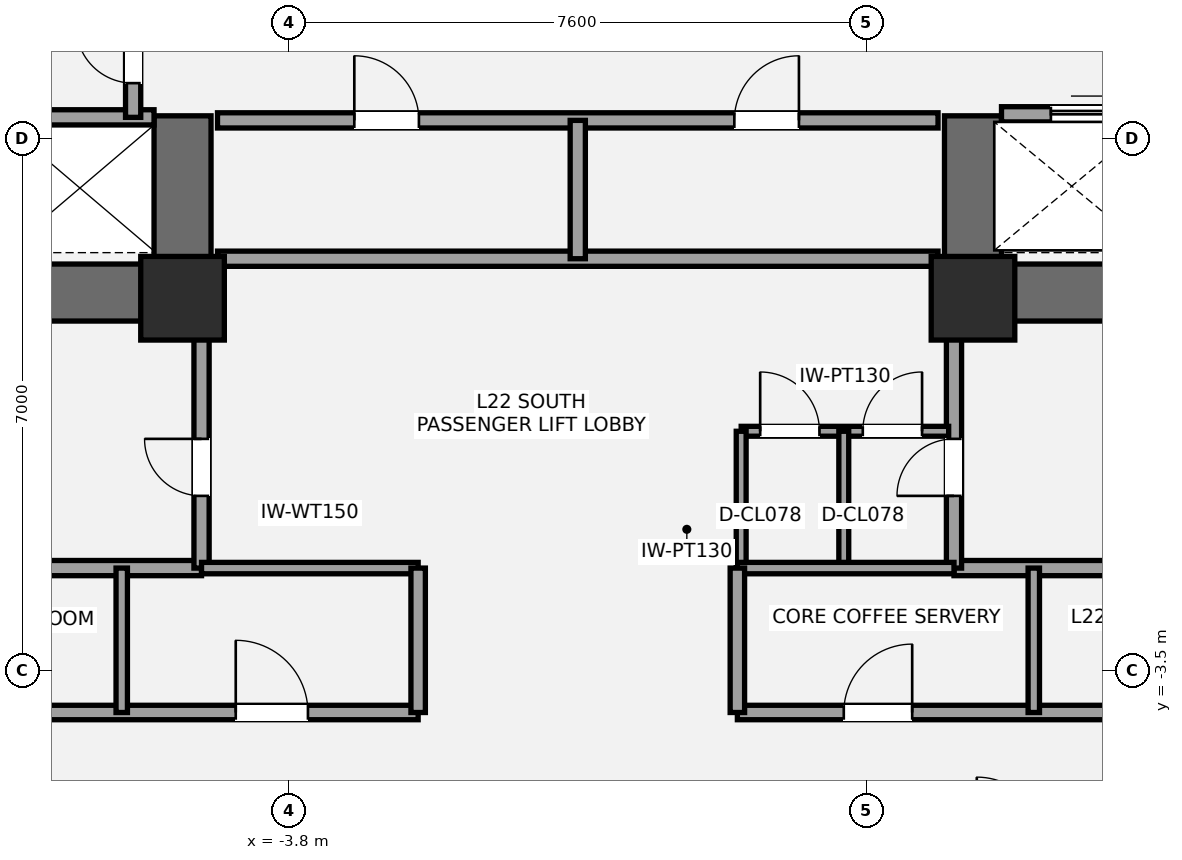
"""IFC4 building model, lengths in metres.
Left out: names, types, materials, properties, quantities, classifications, styles, units other than length and angle.
Written with IfcOpenShell. Run it as: python <this file> out.ifc"""

import sys

from ifc_helpers import new_model, si_unit, direction, frame, frame_2d, origin, origin_2d, place, context, subcontext, project, spatial, rectangle, extrude, element, fill, save


model = new_model("IFC4")
c1 = context("Model", 3, precision=1e-05, world=origin(), true_north=direction((0.0, 1.0)))
c2 = subcontext(c1, "Body", "Model", "MODEL_VIEW")
j1 = project(units=[si_unit("LENGTHUNIT", "METRE"), si_unit("PLANEANGLEUNIT", "RADIAN")], contexts=[c1])
p1 = place(None, origin())
s1 = spatial("IfcSite", under=j1, at=p1, CompositionType="ELEMENT")
p2 = place(p1, origin())
s2 = spatial("IfcBuilding", under=s1, at=p2, CompositionType="ELEMENT")
p3 = place(p2, frame((0.0, 0.0, 86.1)))
s3 = spatial("IfcBuildingStorey", under=s2, at=p3, CompositionType="ELEMENT", Elevation=86.1)
p4 = place(p3, frame((-4.825, 1.475, 0.0), z_axis=(0.0, 0.0, 1.0), x_axis=(-1.0, 0.0, 0.0)))
e1 = element("IfcWall", 1, at=p4, inside=s3, PredefinedType="SHEAR", context=c2, shape_type="SweptSolid", body=[
    extrude(rectangle(XDim=9.075, YDim=0.75, at=frame_2d((4.538, 0.0))), origin(), (0.0, 0.0, 1.0), 3.5),
])
p5 = place(p4, frame((5.475, 0.0, 0.0)))
e2 = element("IfcOpeningElement", 2, at=p5, cuts=e1, PredefinedType="OPENING", context=c2, shape_type="SweptSolid", body=[
    extrude(rectangle(XDim=1.05, YDim=2.15, at=frame_2d((0.525, 1.075))), frame((0.0, 0.385, 0.0), z_axis=(0.0, -1.0, 0.0), x_axis=(1.0, 0.0, 0.0)), (0.0, 0.0, 1.0), 0.77),
])
p6 = place(p4, frame((3.805, 0.0, 0.0)))
e3 = element("IfcOpeningElement", 3, at=p6, cuts=e1, PredefinedType="OPENING", context=c2, shape_type="SweptSolid", body=[
    extrude(rectangle(XDim=1.1, YDim=2.2, at=frame_2d((0.55, 1.1))), frame((0.0, 0.385, 0.0), z_axis=(0.0, -1.0, 0.0), x_axis=(1.0, 0.0, 0.0)), (0.0, 0.0, 1.0), 0.77),
])
p7 = place(p3, frame((-5.2, 1.1, 0.0), z_axis=(0.0, 0.0, 1.0), x_axis=(0.0, 1.0, 0.0)))
e4 = element("IfcWall", 4, at=p7, inside=s3, PredefinedType="SHEAR", context=c2, shape_type="SweptSolid", body=[
    extrude(rectangle(XDim=2.7, YDim=0.75, at=frame_2d((1.35, 0.0))), origin(), (0.0, 0.0, 1.0), 3.5),
])
p8 = place(p3, frame((13.9, 1.475, 0.0), z_axis=(0.0, 0.0, 1.0), x_axis=(-1.0, 0.0, 0.0)))
e5 = element("IfcWall", 5, at=p8, inside=s3, PredefinedType="SHEAR", context=c2, shape_type="SweptSolid", body=[
    extrude(rectangle(XDim=9.075, YDim=0.75, at=frame_2d((4.538, 0.0))), origin(), (0.0, 0.0, 1.0), 3.5),
])
p9 = place(p8, frame((2.55, 0.0, 0.0)))
e6 = element("IfcOpeningElement", 6, at=p9, cuts=e5, PredefinedType="OPENING", context=c2, shape_type="SweptSolid", body=[
    extrude(rectangle(XDim=1.05, YDim=2.15, at=frame_2d((0.525, 1.075))), frame((0.0, 0.385, 0.0), z_axis=(0.0, -1.0, 0.0), x_axis=(1.0, 0.0, 0.0)), (0.0, 0.0, 1.0), 0.77),
])
p10 = place(p8, frame((4.55, 0.0, 0.0)))
e7 = element("IfcOpeningElement", 7, at=p10, cuts=e5, PredefinedType="OPENING", context=c2, shape_type="SweptSolid", body=[
    extrude(rectangle(XDim=1.1, YDim=2.2, at=frame_2d((0.55, 1.1))), frame((0.0, 0.385, 0.0), z_axis=(0.0, -1.0, 0.0), x_axis=(1.0, 0.0, 0.0)), (0.0, 0.0, 1.0), 0.77),
])
p11 = place(p3, frame((5.2, 1.1, 0.0), z_axis=(0.0, 0.0, 1.0), x_axis=(0.0, 1.0, 0.0)))
e8 = element("IfcWall", 8, at=p11, inside=s3, PredefinedType="SHEAR", context=c2, shape_type="SweptSolid", body=[
    extrude(rectangle(XDim=2.7, YDim=0.75, at=frame_2d((1.35, 0.0))), origin(), (0.0, 0.0, 1.0), 3.5),
])
for number, where, z_axis, x_axis in (
    (9, (-5.2, 1.4, 0.0), (0.0, 0.0, 1.0), (1.0, 0.0, 0.0)),
    (10, (5.2, 1.4, 0.0), (0.0, 0.0, 1.0), (1.0, 0.0, 0.0)),
):
    element("IfcColumn", number, at=place(p3, frame(where, z_axis=z_axis, x_axis=x_axis)), inside=s3, PredefinedType="COLUMN", context=c2, shape_type="SweptSolid", body=[
        extrude(rectangle(XDim=1.1, YDim=1.1, at=origin_2d()), origin(), (0.0, 0.0, 1.0), 3.5),
    ])
p12 = place(p3, frame((-7.2, -2.15, 0.0), z_axis=(0.0, 0.0, 1.0), x_axis=(1.0, 0.0, 0.0)))
e11 = element("IfcWall", 11, at=p12, inside=s3, PredefinedType="SOLIDWALL", context=c2, shape_type="SweptSolid", body=[
    extrude(rectangle(XDim=2.25, YDim=0.2, at=frame_2d((1.125, 0.0))), origin(), (0.0, 0.0, 1.0), 3.31),
])
p13 = place(p3, frame((-4.95, -2.15, 0.0), z_axis=(0.0, 0.0, 1.0), x_axis=(0.0, 1.0, 0.0)))
e12 = element("IfcWall", 12, at=p13, inside=s3, PredefinedType="SOLIDWALL", context=c2, shape_type="SweptSolid", body=[
    extrude(rectangle(XDim=3.3, YDim=0.2, at=frame_2d((1.65, 0.0))), origin(), (0.0, 0.0, 1.0), 2.763),
])
p14 = place(p13, frame((0.95, 0.0, 0.0)))
e13 = element("IfcOpeningElement", 13, at=p14, cuts=e12, PredefinedType="OPENING", context=c2, shape_type="SweptSolid", body=[
    extrude(rectangle(XDim=0.75, YDim=2.1, at=frame_2d((0.375, 1.05))), frame((0.0, 0.11, 0.0), z_axis=(0.0, -1.0, 0.0), x_axis=(1.0, 0.0, 0.0)), (0.0, 0.0, 1.0), 0.22),
])
p15 = place(p3, frame((4.95, -2.15, 0.0), z_axis=(0.0, 0.0, 1.0), x_axis=(1.0, 0.0, 0.0)))
e14 = element("IfcWall", 14, at=p15, inside=s3, PredefinedType="SOLIDWALL", context=c2, shape_type="SweptSolid", body=[
    extrude(rectangle(XDim=2.25, YDim=0.2, at=frame_2d((1.125, 0.0))), origin(), (0.0, 0.0, 1.0), 3.31),
])
p16 = place(p3, frame((4.95, -2.15, 0.0), z_axis=(0.0, 0.0, 1.0), x_axis=(0.0, 1.0, 0.0)))
e15 = element("IfcWall", 15, at=p16, inside=s3, PredefinedType="SOLIDWALL", context=c2, shape_type="SweptSolid", body=[
    extrude(rectangle(XDim=3.3, YDim=0.2, at=frame_2d((1.65, 0.0))), origin(), (0.0, 0.0, 1.0), 2.763),
])
p17 = place(p16, frame((0.95, 0.0, 0.0)))
e16 = element("IfcOpeningElement", 16, at=p17, cuts=e15, PredefinedType="OPENING", context=c2, shape_type="SweptSolid", body=[
    extrude(rectangle(XDim=0.75, YDim=2.1, at=frame_2d((0.375, 1.05))), frame((0.0, 0.11, 0.0), z_axis=(0.0, -1.0, 0.0), x_axis=(1.0, 0.0, 0.0)), (0.0, 0.0, 1.0), 0.22),
])
p18 = place(p3, frame((2.15, -0.35, 0.0), z_axis=(0.0, 0.0, 1.0), x_axis=(1.0, 0.0, 0.0)))
e17 = element("IfcWall", 17, at=p18, inside=s3, PredefinedType="PARTITIONING", context=c2, shape_type="SweptSolid", body=[
    extrude(rectangle(XDim=2.73, YDim=0.13, at=frame_2d((1.365, 0.0))), origin(), (0.0, 0.0, 1.0), 3.31),
])
p19 = place(p18, frame((0.25, 0.0, 0.0)))
e18 = element("IfcOpeningElement", 18, at=p19, cuts=e17, PredefinedType="OPENING", context=c2, shape_type="SweptSolid", body=[
    extrude(rectangle(XDim=0.78, YDim=2.1, at=frame_2d((0.39, 1.05))), frame((0.0, 0.075, 0.0), z_axis=(0.0, -1.0, 0.0), x_axis=(1.0, 0.0, 0.0)), (0.0, 0.0, 1.0), 0.15),
])
p20 = place(p18, frame((1.6, 0.0, 0.0)))
e19 = element("IfcOpeningElement", 19, at=p20, cuts=e17, PredefinedType="OPENING", context=c2, shape_type="SweptSolid", body=[
    extrude(rectangle(XDim=0.78, YDim=2.1, at=frame_2d((0.39, 1.05))), frame((0.0, 0.075, 0.0), z_axis=(0.0, -1.0, 0.0), x_axis=(1.0, 0.0, 0.0)), (0.0, 0.0, 1.0), 0.15),
])
for number, where, z_axis, x_axis in (
    (20, (2.15, -2.15, 0.0), (0.0, 0.0, 1.0), (0.0, 1.0, 0.0)),
    (21, (3.5, -2.15, 0.0), (0.0, 0.0, 1.0), (0.0, 1.0, 0.0)),
):
    element("IfcWall", number, at=place(p3, frame(where, z_axis=z_axis, x_axis=x_axis)), inside=s3, PredefinedType="PARTITIONING", context=c2, shape_type="SweptSolid", body=[
        extrude(rectangle(XDim=1.8, YDim=0.13, at=frame_2d((0.9, 0.0))), origin(), (0.0, 0.0, 1.0), 3.31),
    ])
p21 = place(p3, frame((-9.78, 3.78, 0.0), z_axis=(0.0, 0.0, 1.0), x_axis=(1.0, 0.0, 0.0)))
e22 = element("IfcWall", 22, at=p21, inside=s3, PredefinedType="SOLIDWALL", context=c2, shape_type="SweptSolid", body=[
    extrude(rectangle(XDim=4.205, YDim=0.2, at=frame_2d((2.103, 0.0))), origin(), (0.0, 0.0, 1.0), 3.31),
])
p22 = place(p3, frame((-5.85, 3.78, 0.0), z_axis=(0.0, 0.0, 1.0), x_axis=(0.0, 1.0, 0.0)))
e23 = element("IfcWall", 23, at=p22, inside=s3, PredefinedType="SOLIDWALL", context=c2, shape_type="SweptSolid", body=[
    extrude(rectangle(XDim=1.69, YDim=0.2, at=frame_2d((0.845, 0.0))), origin(), (0.0, 0.0, 1.0), 3.31),
])
p23 = place(p22, frame((0.45, 0.0, 0.0)))
e24 = element("IfcOpeningElement", 24, at=p23, cuts=e23, PredefinedType="OPENING", context=c2, shape_type="SweptSolid", body=[
    extrude(rectangle(XDim=0.75, YDim=2.1, at=frame_2d((0.375, 1.05))), frame((0.0, 0.11, 0.0), z_axis=(0.0, -1.0, 0.0), x_axis=(1.0, 0.0, 0.0)), (0.0, 0.0, 1.0), 0.22),
])
p24 = place(p3, frame((5.575, 3.82, 0.0), z_axis=(0.0, 0.0, 1.0), x_axis=(1.0, 0.0, 0.0)))
e25 = element("IfcWall", 25, at=p24, inside=s3, PredefinedType="SOLIDWALL", context=c2, shape_type="SweptSolid", body=[
    extrude(rectangle(XDim=4.205, YDim=0.2, at=frame_2d((2.103, 0.0))), origin(), (0.0, 0.0, 1.0), 3.31),
])
p25 = place(p24, frame((0.65, 0.0, 0.0)))
e26 = element("IfcOpeningElement", 26, at=p25, cuts=e25, PredefinedType="OPENING", context=c2, shape_type="SweptSolid", body=[
    extrude(rectangle(XDim=1.2, YDim=2.2, at=frame_2d((0.6, 1.1))), frame((0.0, 0.11, 0.0), z_axis=(0.0, -1.0, 0.0), x_axis=(1.0, 0.0, 0.0)), (0.0, 0.0, 1.0), 0.22),
])
p26 = place(p3, frame((-4.74, 1.92, 0.0), z_axis=(0.0, 0.0, 1.0), x_axis=(1.0, 0.0, 0.0)))
e27 = element("IfcWall", 27, at=p26, inside=s3, PredefinedType="SOLIDWALL", context=c2, shape_type="SweptSolid", body=[
    extrude(rectangle(XDim=9.48, YDim=0.2, at=frame_2d((4.74, 0.0))), origin(), (0.0, 0.0, 1.0), 2.3),
])
p27 = place(p3, frame((-4.74, 3.74, 0.0), z_axis=(0.0, 0.0, 1.0), x_axis=(1.0, 0.0, 0.0)))
e28 = element("IfcWall", 28, at=p27, inside=s3, PredefinedType="SOLIDWALL", context=c2, shape_type="SweptSolid", body=[
    extrude(rectangle(XDim=9.48, YDim=0.2, at=frame_2d((4.74, 0.0))), origin(), (0.0, 0.0, 1.0), 3.31),
])
p28 = place(p27, frame((1.8, 0.0, 0.0)))
e29 = element("IfcOpeningElement", 29, at=p28, cuts=e28, PredefinedType="OPENING", context=c2, shape_type="SweptSolid", body=[
    extrude(rectangle(XDim=0.85, YDim=2.1, at=frame_2d((0.425, 1.05))), frame((0.0, 0.11, 0.0), z_axis=(0.0, -1.0, 0.0), x_axis=(1.0, 0.0, 0.0)), (0.0, 0.0, 1.0), 0.22),
])
p29 = place(p27, frame((6.8, 0.0, 0.0)))
e30 = element("IfcOpeningElement", 30, at=p29, cuts=e28, PredefinedType="OPENING", context=c2, shape_type="SweptSolid", body=[
    extrude(rectangle(XDim=0.85, YDim=2.1, at=frame_2d((0.425, 1.05))), frame((0.0, 0.11, 0.0), z_axis=(0.0, -1.0, 0.0), x_axis=(1.0, 0.0, 0.0)), (0.0, 0.0, 1.0), 0.22),
])
p30 = place(p3, frame((0.0, 1.92, 0.0), z_axis=(0.0, 0.0, 1.0), x_axis=(0.0, 1.0, 0.0)))
e31 = element("IfcWall", 31, at=p30, inside=s3, PredefinedType="SOLIDWALL", context=c2, shape_type="SweptSolid", body=[
    extrude(rectangle(XDim=1.82, YDim=0.2, at=frame_2d((0.91, 0.0))), origin(), (0.0, 0.0, 1.0), 3.31),
])
p31 = place(p3, frame((-13.45, -4.05, 0.0), z_axis=(0.0, 0.0, 1.0), x_axis=(1.0, 0.0, 0.0)))
e32 = element("IfcWall", 32, at=p31, inside=s3, PredefinedType="PLUMBINGWALL", context=c2, shape_type="SweptSolid", body=[
    extrude(rectangle(XDim=11.35, YDim=0.19, at=frame_2d((5.675, 0.0))), origin(), (0.0, 0.0, 1.0), 2.763),
])
p32 = place(p31, frame((1.25, 0.0, 0.0)))
e33 = element("IfcOpeningElement", 33, at=p32, cuts=e32, PredefinedType="OPENING", context=c2, shape_type="SweptSolid", body=[
    extrude(rectangle(XDim=0.85, YDim=2.1, at=frame_2d((0.425, 1.05))), frame((0.0, 0.105, 0.0), z_axis=(0.0, -1.0, 0.0), x_axis=(1.0, 0.0, 0.0)), (0.0, 0.0, 1.0), 0.21),
])
p33 = place(p31, frame((5.1, 0.0, 0.0)))
e34 = element("IfcOpeningElement", 34, at=p33, cuts=e32, PredefinedType="OPENING", context=c2, shape_type="SweptSolid", body=[
    extrude(rectangle(XDim=0.85, YDim=2.1, at=frame_2d((0.425, 1.05))), frame((0.0, 0.105, 0.0), z_axis=(0.0, -1.0, 0.0), x_axis=(1.0, 0.0, 0.0)), (0.0, 0.0, 1.0), 0.21),
])
p34 = place(p31, frame((8.95, 0.0, 0.0)))
e35 = element("IfcOpeningElement", 35, at=p34, cuts=e32, PredefinedType="OPENING", context=c2, shape_type="SweptSolid", body=[
    extrude(rectangle(XDim=0.95, YDim=2.15, at=frame_2d((0.475, 1.075))), frame((0.0, 0.105, 0.0), z_axis=(0.0, -1.0, 0.0), x_axis=(1.0, 0.0, 0.0)), (0.0, 0.0, 1.0), 0.21),
])
p35 = place(p3, frame((-4.95, -2.15, 0.0), z_axis=(0.0, 0.0, 1.0), x_axis=(1.0, 0.0, 0.0)))
e36 = element("IfcWall", 36, at=p35, inside=s3, PredefinedType="PLUMBINGWALL", context=c2, shape_type="SweptSolid", body=[
    extrude(rectangle(XDim=2.85, YDim=0.15, at=frame_2d((1.425, 0.0))), origin(), (0.0, 0.0, 1.0), 3.31),
])
p36 = place(p3, frame((-2.1, -4.05, 0.0), z_axis=(0.0, 0.0, 1.0), x_axis=(0.0, 1.0, 0.0)))
e37 = element("IfcWall", 37, at=p36, inside=s3, PredefinedType="PLUMBINGWALL", context=c2, shape_type="SweptSolid", body=[
    extrude(rectangle(XDim=1.9, YDim=0.19, at=frame_2d((0.95, 0.0))), origin(), (0.0, 0.0, 1.0), 3.31),
])
p37 = place(p3, frame((-6.0, -4.05, 0.0), z_axis=(0.0, 0.0, 1.0), x_axis=(0.0, 1.0, 0.0)))
e38 = element("IfcWall", 38, at=p37, inside=s3, PredefinedType="PLUMBINGWALL", context=c2, shape_type="SweptSolid", body=[
    extrude(rectangle(XDim=1.9, YDim=0.15, at=frame_2d((0.95, 0.0))), origin(), (0.0, 0.0, 1.0), 2.751),
])
p38 = place(p3, frame((2.1, -4.05, 0.0), z_axis=(0.0, 0.0, 1.0), x_axis=(1.0, 0.0, 0.0)))
e39 = element("IfcWall", 39, at=p38, inside=s3, PredefinedType="PLUMBINGWALL", context=c2, shape_type="SweptSolid", body=[
    extrude(rectangle(XDim=11.35, YDim=0.19, at=frame_2d((5.675, 0.0))), origin(), (0.0, 0.0, 1.0), 2.763),
])
p39 = place(p38, frame((1.4, 0.0, 0.0)))
e40 = element("IfcOpeningElement", 40, at=p39, cuts=e39, PredefinedType="OPENING", context=c2, shape_type="SweptSolid", body=[
    extrude(rectangle(XDim=0.9, YDim=2.1, at=frame_2d((0.45, 1.05))), frame((0.0, 0.105, 0.0), z_axis=(0.0, -1.0, 0.0), x_axis=(1.0, 0.0, 0.0)), (0.0, 0.0, 1.0), 0.21),
])
p40 = place(p38, frame((5.3, 0.0, 0.0)))
e41 = element("IfcOpeningElement", 41, at=p40, cuts=e39, PredefinedType="OPENING", context=c2, shape_type="SweptSolid", body=[
    extrude(rectangle(XDim=0.9, YDim=2.1, at=frame_2d((0.45, 1.05))), frame((0.0, 0.105, 0.0), z_axis=(0.0, -1.0, 0.0), x_axis=(1.0, 0.0, 0.0)), (0.0, 0.0, 1.0), 0.21),
])
p41 = place(p38, frame((9.1, 0.0, 0.0)))
e42 = element("IfcOpeningElement", 42, at=p41, cuts=e39, PredefinedType="OPENING", context=c2, shape_type="SweptSolid", body=[
    extrude(rectangle(XDim=0.9, YDim=2.1, at=frame_2d((0.45, 1.05))), frame((0.0, 0.105, 0.0), z_axis=(0.0, -1.0, 0.0), x_axis=(1.0, 0.0, 0.0)), (0.0, 0.0, 1.0), 0.21),
])
p42 = place(p3, frame((2.1, -2.15, 0.0), z_axis=(0.0, 0.0, 1.0), x_axis=(1.0, 0.0, 0.0)))
e43 = element("IfcWall", 43, at=p42, inside=s3, PredefinedType="PLUMBINGWALL", context=c2, shape_type="SweptSolid", body=[
    extrude(rectangle(XDim=2.85, YDim=0.15, at=frame_2d((1.425, 0.0))), origin(), (0.0, 0.0, 1.0), 3.31),
])
p43 = place(p3, frame((2.1, -4.05, 0.0), z_axis=(0.0, 0.0, 1.0), x_axis=(0.0, 1.0, 0.0)))
e44 = element("IfcWall", 44, at=p43, inside=s3, PredefinedType="PLUMBINGWALL", context=c2, shape_type="SweptSolid", body=[
    extrude(rectangle(XDim=1.9, YDim=0.19, at=frame_2d((0.95, 0.0))), origin(), (0.0, 0.0, 1.0), 3.31),
])
p44 = place(p3, frame((6.0, -4.05, 0.0), z_axis=(0.0, 0.0, 1.0), x_axis=(0.0, 1.0, 0.0)))
e45 = element("IfcWall", 45, at=p44, inside=s3, PredefinedType="PLUMBINGWALL", context=c2, shape_type="SweptSolid", body=[
    extrude(rectangle(XDim=1.9, YDim=0.15, at=frame_2d((0.95, 0.0))), origin(), (0.0, 0.0, 1.0), 2.751),
])
p45 = place(p14, origin())
e46 = element("IfcDoor", 46, at=p45, inside=s3, OperationType="SINGLE_SWING_RIGHT", PredefinedType="DOOR", context=c2, shape_type="SweptSolid", body=[
    extrude(rectangle(XDim=0.75, YDim=2.1, at=frame_2d((0.375, 1.05))), frame((0.0, 0.025, 0.0), z_axis=(0.0, -1.0, 0.0), x_axis=(1.0, 0.0, 0.0)), (0.0, 0.0, 1.0), 0.05),
])
fill(e13, e46)
p46 = place(p17, origin())
e47 = element("IfcDoor", 47, at=p46, inside=s3, OperationType="SINGLE_SWING_LEFT", PredefinedType="DOOR", context=c2, shape_type="SweptSolid", body=[
    extrude(rectangle(XDim=0.75, YDim=2.1, at=frame_2d((0.375, 1.05))), frame((0.0, 0.025, 0.0), z_axis=(0.0, -1.0, 0.0), x_axis=(1.0, 0.0, 0.0)), (0.0, 0.0, 1.0), 0.05),
])
fill(e16, e47)
p47 = place(p19, origin())
e48 = element("IfcDoor", 48, at=p47, inside=s3, OperationType="SINGLE_SWING_LEFT", PredefinedType="DOOR", context=c2, shape_type="SweptSolid", body=[
    extrude(rectangle(XDim=0.78, YDim=2.1, at=frame_2d((0.39, 1.05))), frame((0.0, 0.025, 0.0), z_axis=(0.0, -1.0, 0.0), x_axis=(1.0, 0.0, 0.0)), (0.0, 0.0, 1.0), 0.05),
])
fill(e18, e48)
p48 = place(p20, origin())
e49 = element("IfcDoor", 49, at=p48, inside=s3, OperationType="SINGLE_SWING_RIGHT", PredefinedType="DOOR", context=c2, shape_type="SweptSolid", body=[
    extrude(rectangle(XDim=0.78, YDim=2.1, at=frame_2d((0.39, 1.05))), frame((0.0, 0.025, 0.0), z_axis=(0.0, -1.0, 0.0), x_axis=(1.0, 0.0, 0.0)), (0.0, 0.0, 1.0), 0.05),
])
fill(e19, e49)
p49 = place(p23, origin())
e50 = element("IfcDoor", 50, at=p49, inside=s3, OperationType="SINGLE_SWING_RIGHT", PredefinedType="DOOR", context=c2, shape_type="SweptSolid", body=[
    extrude(rectangle(XDim=0.75, YDim=2.1, at=frame_2d((0.375, 1.05))), frame((0.0, 0.025, 0.0), z_axis=(0.0, -1.0, 0.0), x_axis=(1.0, 0.0, 0.0)), (0.0, 0.0, 1.0), 0.05),
])
fill(e24, e50)
p50 = place(p25, origin())
e51 = element("IfcDoor", 51, at=p50, inside=s3, OperationType="SLIDING_TO_RIGHT", PredefinedType="DOOR", context=c2, shape_type="SweptSolid", body=[
    extrude(rectangle(XDim=1.2, YDim=2.2, at=frame_2d((0.6, 1.1))), frame((0.0, 0.025, 0.0), z_axis=(0.0, -1.0, 0.0), x_axis=(1.0, 0.0, 0.0)), (0.0, 0.0, 1.0), 0.05),
])
fill(e26, e51)
p51 = place(p28, origin())
e52 = element("IfcDoor", 52, at=p51, inside=s3, OperationType="SINGLE_SWING_LEFT", PredefinedType="DOOR", context=c2, shape_type="SweptSolid", body=[
    extrude(rectangle(XDim=0.85, YDim=2.1, at=frame_2d((0.425, 1.05))), frame((0.0, 0.025, 0.0), z_axis=(0.0, -1.0, 0.0), x_axis=(1.0, 0.0, 0.0)), (0.0, 0.0, 1.0), 0.05),
])
fill(e29, e52)
p52 = place(p29, origin())
e53 = element("IfcDoor", 53, at=p52, inside=s3, OperationType="SINGLE_SWING_RIGHT", PredefinedType="DOOR", context=c2, shape_type="SweptSolid", body=[
    extrude(rectangle(XDim=0.85, YDim=2.1, at=frame_2d((0.425, 1.05))), frame((0.0, 0.025, 0.0), z_axis=(0.0, -1.0, 0.0), x_axis=(1.0, 0.0, 0.0)), (0.0, 0.0, 1.0), 0.05),
])
fill(e30, e53)
p53 = place(p34, origin())
e54 = element("IfcDoor", 54, at=p53, inside=s3, OperationType="SINGLE_SWING_LEFT", PredefinedType="DOOR", context=c2, shape_type="SweptSolid", body=[
    extrude(rectangle(XDim=0.95, YDim=2.15, at=frame_2d((0.475, 1.075))), frame((0.0, 0.025, 0.0), z_axis=(0.0, -1.0, 0.0), x_axis=(1.0, 0.0, 0.0)), (0.0, 0.0, 1.0), 0.05),
])
fill(e35, e54)
p54 = place(p39, origin())
e55 = element("IfcDoor", 55, at=p54, inside=s3, OperationType="SINGLE_SWING_RIGHT", PredefinedType="DOOR", context=c2, shape_type="SweptSolid", body=[
    extrude(rectangle(XDim=0.9, YDim=2.1, at=frame_2d((0.45, 1.05))), frame((0.0, 0.025, 0.0), z_axis=(0.0, -1.0, 0.0), x_axis=(1.0, 0.0, 0.0)), (0.0, 0.0, 1.0), 0.05),
])
fill(e40, e55)
save(model, sys.argv[1])
